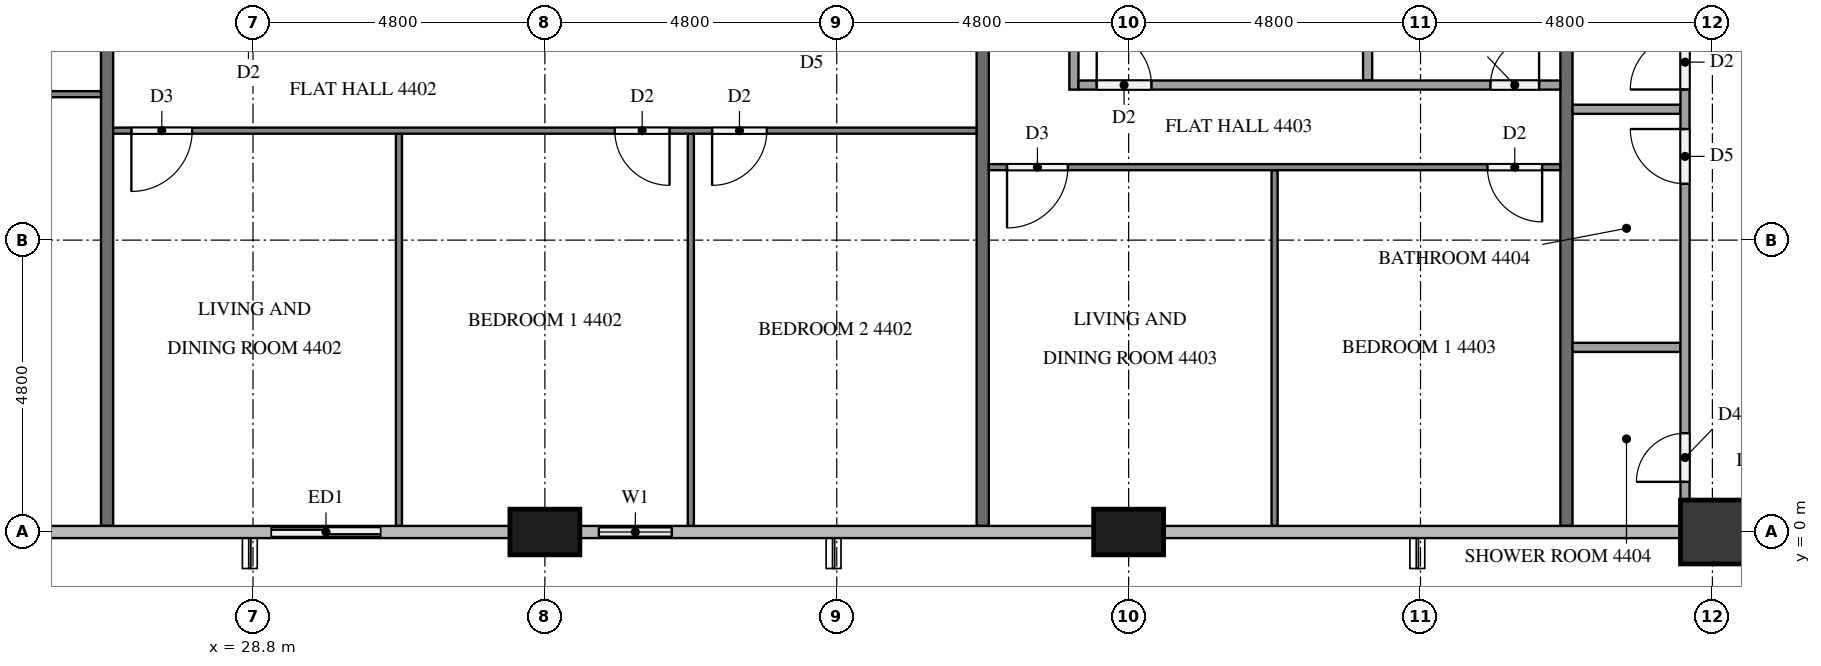
"""IFC4 building model, lengths in metres.
Left out: names, types, materials, properties, quantities, classifications, styles, units other than length and angle.
Written with IfcOpenShell. Run it as: python <this file> out.ifc"""

import sys

from ifc_helpers import new_model, si_unit, direction, frame, frame_2d, origin, origin_2d, place, context, subcontext, project, spatial, rectangle, extrude, element, fill, save


model = new_model("IFC4")
c1 = context("Model", 3, precision=1e-05, world=origin(), true_north=direction((0.0, 1.0)))
c2 = subcontext(c1, "Body", "Model", "MODEL_VIEW")
j1 = project(units=[si_unit("LENGTHUNIT", "METRE"), si_unit("PLANEANGLEUNIT", "RADIAN")], contexts=[c1])
p1 = place(None, origin())
s1 = spatial("IfcSite", under=j1, at=p1, CompositionType="ELEMENT")
p2 = place(p1, origin())
s2 = spatial("IfcBuilding", under=s1, at=p2, CompositionType="ELEMENT")
p3 = place(p2, frame((0.0, 0.0, 170.0)))
s3 = spatial("IfcBuildingStorey", under=s2, at=p3, CompositionType="ELEMENT", Elevation=170.0)
for number, where, z_axis, x_axis in (
    (1, (33.6, 0.0, 0.0), (0.0, 0.0, 1.0), (1.0, 0.0, 0.0)),
    (2, (43.2, 0.0, 0.0), (0.0, 0.0, 1.0), (1.0, 0.0, 0.0)),
):
    element("IfcColumn", number, at=place(p3, frame(where, z_axis=z_axis, x_axis=x_axis)), inside=s3, PredefinedType="COLUMN", context=c2, shape_type="SweptSolid", body=[
        extrude(rectangle(XDim=1.15, YDim=0.75, at=origin_2d()), origin(), (0.0, 0.0, 1.0), 3.1),
    ])
p4 = place(p3, frame((52.8, 0.0, 0.0), z_axis=(0.0, 0.0, 1.0), x_axis=(1.0, 0.0, 0.0)))
e3 = element("IfcColumn", 3, at=p4, inside=s3, PredefinedType="COLUMN", context=c2, shape_type="SweptSolid", body=[
    extrude(rectangle(XDim=1.05, YDim=1.05, at=origin_2d()), origin(), (0.0, 0.0, 1.0), 3.1),
])
p5 = place(p3, frame((28.8, 0.0, 0.0), z_axis=(0.0, 0.0, 1.0), x_axis=(1.0, 0.0, 0.0)))
e4 = element("IfcWall", 4, at=p5, inside=s3, PredefinedType="SOLIDWALL", context=c2, shape_type="SweptSolid", body=[
    extrude(rectangle(XDim=2.4, YDim=0.15, at=frame_2d((1.2, 0.0))), origin(), (0.0, 0.0, 1.0), 3.1),
])
p6 = place(p5, frame((0.3, 0.0, 0.0)))
e5 = element("IfcOpeningElement", 5, at=p6, cuts=e4, PredefinedType="OPENING", context=c2, shape_type="SweptSolid", body=[
    extrude(rectangle(XDim=1.8, YDim=2.4, at=frame_2d((0.9, 1.2))), frame((0.0, 0.085, 0.0), z_axis=(0.0, -1.0, 0.0), x_axis=(1.0, 0.0, 0.0)), (0.0, 0.0, 1.0), 0.17),
])
p7 = place(p3, frame((34.175, 0.0, 0.0), z_axis=(0.0, 0.0, 1.0), x_axis=(1.0, 0.0, 0.0)))
e6 = element("IfcWall", 6, at=p7, inside=s3, PredefinedType="SOLIDWALL", context=c2, shape_type="SweptSolid", body=[
    extrude(rectangle(XDim=1.825, YDim=0.15, at=frame_2d((0.913, 0.0))), origin(), (0.0, 0.0, 1.0), 3.1),
])
p8 = place(p7, frame((0.312, 0.0, 0.9)))
e7 = element("IfcOpeningElement", 7, at=p8, cuts=e6, PredefinedType="OPENING", context=c2, shape_type="SweptSolid", body=[
    extrude(rectangle(XDim=1.2, YDim=1.4, at=frame_2d((0.6, 0.7))), frame((0.0, 0.085, 0.0), z_axis=(0.0, -1.0, 0.0), x_axis=(1.0, 0.0, 0.0)), (0.0, 0.0, 1.0), 0.17),
])
for number, where, z_axis, x_axis in (
    (8, (26.4, 11.9, 0.0), (0.0, 0.0, 1.0), (0.0, -1.0, 0.0)),
    (9, (40.8, 11.9, 0.0), (0.0, 0.0, 1.0), (0.0, -1.0, 0.0)),
    (10, (50.4, 11.9, 0.0), (0.0, 0.0, 1.0), (0.0, -1.0, 0.0)),
):
    element("IfcWall", number, at=place(p3, frame(where, z_axis=z_axis, x_axis=x_axis)), inside=s3, PredefinedType="PARTITIONING", context=c2, shape_type="SweptSolid", body=[
        extrude(rectangle(XDim=11.8, YDim=0.2, at=frame_2d((5.9, 0.0))), origin(), (0.0, 0.0, 1.0), 3.1),
    ])
p9 = place(p3, frame((26.3, 7.2, 0.0), z_axis=(0.0, 0.0, 1.0), x_axis=(-1.0, 0.0, 0.0)))
e11 = element("IfcWall", 11, at=p9, inside=s3, PredefinedType="PARTITIONING", context=c2, shape_type="SweptSolid", body=[
    extrude(rectangle(XDim=14.2, YDim=0.1, at=frame_2d((7.1, 0.0))), origin(), (0.0, 0.0, 1.0), 3.1),
])
p10 = place(p9, frame((12.9, 0.0, 0.0)))
e12 = element("IfcOpeningElement", 12, at=p10, cuts=e11, PredefinedType="OPENING", context=c2, shape_type="SweptSolid", body=[
    extrude(rectangle(XDim=1.0, YDim=2.1, at=frame_2d((0.5, 1.05))), frame((0.0, 0.06, 0.0), z_axis=(0.0, -1.0, 0.0), x_axis=(1.0, 0.0, 0.0)), (0.0, 0.0, 1.0), 0.12),
])
p11 = place(p9, frame((5.05, 0.0, 0.0)))
e13 = element("IfcOpeningElement", 13, at=p11, cuts=e11, PredefinedType="OPENING", context=c2, shape_type="SweptSolid", body=[
    extrude(rectangle(XDim=0.9, YDim=2.1, at=frame_2d((0.45, 1.05))), frame((0.0, 0.06, 0.0), z_axis=(0.0, -1.0, 0.0), x_axis=(1.0, 0.0, 0.0)), (0.0, 0.0, 1.0), 0.12),
])
p12 = place(p9, frame((3.45, 0.0, 0.0)))
e14 = element("IfcOpeningElement", 14, at=p12, cuts=e11, PredefinedType="OPENING", context=c2, shape_type="SweptSolid", body=[
    extrude(rectangle(XDim=0.9, YDim=2.1, at=frame_2d((0.45, 1.05))), frame((0.0, 0.06, 0.0), z_axis=(0.0, -1.0, 0.0), x_axis=(1.0, 0.0, 0.0)), (0.0, 0.0, 1.0), 0.12),
])
for number, where, z_axis, x_axis in (
    (15, (31.2, 6.55, 0.0), (0.0, 0.0, 1.0), (0.0, -1.0, 0.0)),
    (16, (36.0, 6.55, 0.0), (0.0, 0.0, 1.0), (0.0, -1.0, 0.0)),
):
    element("IfcWall", number, at=place(p3, frame(where, z_axis=z_axis, x_axis=x_axis)), inside=s3, PredefinedType="PARTITIONING", context=c2, shape_type="SweptSolid", body=[
        extrude(rectangle(XDim=6.45, YDim=0.1, at=frame_2d((3.225, 0.0))), origin(), (0.0, 0.0, 1.0), 3.1),
    ])
p13 = place(p3, frame((40.7, 6.6, 0.0), z_axis=(0.0, 0.0, 1.0), x_axis=(-1.0, 0.0, 0.0)))
e17 = element("IfcWall", 17, at=p13, inside=s3, PredefinedType="PARTITIONING", context=c2, shape_type="SweptSolid", body=[
    extrude(rectangle(XDim=14.2, YDim=0.1, at=frame_2d((7.1, 0.0))), origin(), (0.0, 0.0, 1.0), 3.1),
])
p14 = place(p13, frame((12.9, 0.0, 0.0)))
e18 = element("IfcOpeningElement", 18, at=p14, cuts=e17, PredefinedType="OPENING", context=c2, shape_type="SweptSolid", body=[
    extrude(rectangle(XDim=1.0, YDim=2.1, at=frame_2d((0.5, 1.05))), frame((0.0, 0.06, 0.0), z_axis=(0.0, -1.0, 0.0), x_axis=(1.0, 0.0, 0.0)), (0.0, 0.0, 1.0), 0.12),
])
p15 = place(p13, frame((5.05, 0.0, 0.0)))
e19 = element("IfcOpeningElement", 19, at=p15, cuts=e17, PredefinedType="OPENING", context=c2, shape_type="SweptSolid", body=[
    extrude(rectangle(XDim=0.9, YDim=2.1, at=frame_2d((0.45, 1.05))), frame((0.0, 0.06, 0.0), z_axis=(0.0, -1.0, 0.0), x_axis=(1.0, 0.0, 0.0)), (0.0, 0.0, 1.0), 0.12),
])
p16 = place(p13, frame((3.45, 0.0, 0.0)))
e20 = element("IfcOpeningElement", 20, at=p16, cuts=e17, PredefinedType="OPENING", context=c2, shape_type="SweptSolid", body=[
    extrude(rectangle(XDim=0.9, YDim=2.1, at=frame_2d((0.45, 1.05))), frame((0.0, 0.06, 0.0), z_axis=(0.0, -1.0, 0.0), x_axis=(1.0, 0.0, 0.0)), (0.0, 0.0, 1.0), 0.12),
])
p17 = place(p3, frame((45.6, 5.95, 0.0), z_axis=(0.0, 0.0, 1.0), x_axis=(0.0, -1.0, 0.0)))
e21 = element("IfcWall", 21, at=p17, inside=s3, PredefinedType="PARTITIONING", context=c2, shape_type="SweptSolid", body=[
    extrude(rectangle(XDim=5.85, YDim=0.1, at=frame_2d((2.925, 0.0))), origin(), (0.0, 0.0, 1.0), 3.1),
])
p18 = place(p3, frame((50.3, 6.0, 0.0), z_axis=(0.0, 0.0, 1.0), x_axis=(-1.0, 0.0, 0.0)))
e22 = element("IfcWall", 22, at=p18, inside=s3, PredefinedType="PARTITIONING", context=c2, shape_type="SweptSolid", body=[
    extrude(rectangle(XDim=9.4, YDim=0.1, at=frame_2d((4.7, 0.0))), origin(), (0.0, 0.0, 1.0), 3.1),
])
p19 = place(p18, frame((8.1, 0.0, 0.0)))
e23 = element("IfcOpeningElement", 23, at=p19, cuts=e22, PredefinedType="OPENING", context=c2, shape_type="SweptSolid", body=[
    extrude(rectangle(XDim=1.0, YDim=2.1, at=frame_2d((0.5, 1.05))), frame((0.0, 0.06, 0.0), z_axis=(0.0, -1.0, 0.0), x_axis=(1.0, 0.0, 0.0)), (0.0, 0.0, 1.0), 0.12),
])
p20 = place(p18, frame((0.3, 0.0, 0.0)))
e24 = element("IfcOpeningElement", 24, at=p20, cuts=e22, PredefinedType="OPENING", context=c2, shape_type="SweptSolid", body=[
    extrude(rectangle(XDim=0.9, YDim=2.1, at=frame_2d((0.45, 1.05))), frame((0.0, 0.06, 0.0), z_axis=(0.0, -1.0, 0.0), x_axis=(1.0, 0.0, 0.0)), (0.0, 0.0, 1.0), 0.12),
])
p21 = place(p3, frame((47.13, 11.9, 0.0), z_axis=(0.0, 0.0, 1.0), x_axis=(0.0, -1.0, 0.0)))
e25 = element("IfcWall", 25, at=p21, inside=s3, PredefinedType="PARTITIONING", context=c2, shape_type="SweptSolid", body=[
    extrude(rectangle(XDim=4.475, YDim=0.15, at=frame_2d((2.237, 0.0))), origin(), (0.0, 0.0, 1.0), 3.1),
])
p22 = place(p3, frame((42.3, 11.9, 0.0), z_axis=(0.0, 0.0, 1.0), x_axis=(0.0, -1.0, 0.0)))
e26 = element("IfcWall", 26, at=p22, inside=s3, PredefinedType="PARTITIONING", context=c2, shape_type="SweptSolid", body=[
    extrude(rectangle(XDim=4.625, YDim=0.15, at=frame_2d((2.312, 0.0))), origin(), (0.0, 0.0, 1.0), 3.1),
])
p23 = place(p3, frame((42.375, 7.35, 0.0), z_axis=(0.0, 0.0, 1.0), x_axis=(1.0, 0.0, 0.0)))
e27 = element("IfcWall", 27, at=p23, inside=s3, PredefinedType="PARTITIONING", context=c2, shape_type="SweptSolid", body=[
    extrude(rectangle(XDim=7.925, YDim=0.15, at=frame_2d((3.962, 0.0))), origin(), (0.0, 0.0, 1.0), 3.1),
])
p24 = place(p23, frame((0.3, 0.0, 0.0)))
e28 = element("IfcOpeningElement", 28, at=p24, cuts=e27, PredefinedType="OPENING", context=c2, shape_type="SweptSolid", body=[
    extrude(rectangle(XDim=0.9, YDim=2.1, at=frame_2d((0.45, 1.05))), frame((0.0, 0.085, 0.0), z_axis=(0.0, -1.0, 0.0), x_axis=(1.0, 0.0, 0.0)), (0.0, 0.0, 1.0), 0.17),
])
p25 = place(p23, frame((6.775, 0.0, 0.0)))
e29 = element("IfcOpeningElement", 29, at=p25, cuts=e27, PredefinedType="OPENING", context=c2, shape_type="SweptSolid", body=[
    extrude(rectangle(XDim=0.8, YDim=2.1, at=frame_2d((0.4, 1.05))), frame((0.0, 0.085, 0.0), z_axis=(0.0, -1.0, 0.0), x_axis=(1.0, 0.0, 0.0)), (0.0, 0.0, 1.0), 0.17),
])
for number, where, z_axis, x_axis in (
    (30, (50.5, 6.952, 0.0), (0.0, 0.0, 1.0), (1.0, 0.0, 0.0)),
    (31, (50.5, 3.037, 0.0), (0.0, 0.0, 1.0), (1.0, 0.0, 0.0)),
):
    element("IfcWall", number, at=place(p3, frame(where, z_axis=z_axis, x_axis=x_axis)), inside=s3, PredefinedType="PARTITIONING", context=c2, shape_type="SweptSolid", body=[
        extrude(rectangle(XDim=1.775, YDim=0.15, at=frame_2d((0.887, 0.0))), origin(), (0.0, 0.0, 1.0), 3.1),
    ])
p26 = place(p3, frame((52.35, 0.525, 0.0), z_axis=(0.0, 0.0, 1.0), x_axis=(0.0, 1.0, 0.0)))
e32 = element("IfcWall", 32, at=p26, inside=s3, PredefinedType="PARTITIONING", context=c2, shape_type="SweptSolid", body=[
    extrude(rectangle(XDim=12.3, YDim=0.15, at=frame_2d((6.15, 0.0))), origin(), (0.0, 0.0, 1.0), 3.1),
])
p27 = place(p26, frame((6.752, 0.0, 0.0)))
e33 = element("IfcOpeningElement", 33, at=p27, cuts=e32, PredefinedType="OPENING", context=c2, shape_type="SweptSolid", body=[
    extrude(rectangle(XDim=0.9, YDim=2.1, at=frame_2d((0.45, 1.05))), frame((0.0, 0.085, 0.0), z_axis=(0.0, -1.0, 0.0), x_axis=(1.0, 0.0, 0.0)), (0.0, 0.0, 1.0), 0.17),
])
p28 = place(p26, frame((5.202, 0.0, 0.0)))
e34 = element("IfcOpeningElement", 34, at=p28, cuts=e32, PredefinedType="OPENING", context=c2, shape_type="SweptSolid", body=[
    extrude(rectangle(XDim=0.9, YDim=2.1, at=frame_2d((0.45, 1.05))), frame((0.0, 0.085, 0.0), z_axis=(0.0, -1.0, 0.0), x_axis=(1.0, 0.0, 0.0)), (0.0, 0.0, 1.0), 0.17),
])
p29 = place(p26, frame((0.3, 0.0, 0.0)))
e35 = element("IfcOpeningElement", 35, at=p29, cuts=e32, PredefinedType="OPENING", context=c2, shape_type="SweptSolid", body=[
    extrude(rectangle(XDim=0.8, YDim=2.1, at=frame_2d((0.4, 1.05))), frame((0.0, 0.085, 0.0), z_axis=(0.0, -1.0, 0.0), x_axis=(1.0, 0.0, 0.0)), (0.0, 0.0, 1.0), 0.17),
])
p30 = place(p6, origin())
e36 = element("IfcDoor", 36, at=p30, inside=s3, OperationType="SLIDING_TO_LEFT", PredefinedType="DOOR", context=c2, shape_type="SweptSolid", body=[
    extrude(rectangle(XDim=1.8, YDim=2.4, at=frame_2d((0.9, 1.2))), frame((0.0, 0.025, 0.0), z_axis=(0.0, -1.0, 0.0), x_axis=(1.0, 0.0, 0.0)), (0.0, 0.0, 1.0), 0.05),
])
fill(e5, e36)
p31 = place(p8, origin())
e37 = element("IfcWindow", 37, at=p31, inside=s3, PartitioningType="SINGLE_PANEL", PredefinedType="WINDOW", context=c2, shape_type="SweptSolid", body=[
    extrude(rectangle(XDim=1.2, YDim=1.4, at=frame_2d((0.6, 0.7))), frame((0.0, 0.03, 0.0), z_axis=(0.0, -1.0, 0.0), x_axis=(1.0, 0.0, 0.0)), (0.0, 0.0, 1.0), 0.06),
])
fill(e7, e37)
p32 = place(p14, origin())
e38 = element("IfcDoor", 38, at=p32, inside=s3, OperationType="SINGLE_SWING_RIGHT", PredefinedType="DOOR", context=c2, shape_type="SweptSolid", body=[
    extrude(rectangle(XDim=1.0, YDim=2.1, at=frame_2d((0.5, 1.05))), frame((0.0, 0.025, 0.0), z_axis=(0.0, -1.0, 0.0), x_axis=(1.0, 0.0, 0.0)), (0.0, 0.0, 1.0), 0.05),
])
fill(e18, e38)
p33 = place(p15, origin())
e39 = element("IfcDoor", 39, at=p33, inside=s3, OperationType="SINGLE_SWING_LEFT", PredefinedType="DOOR", context=c2, shape_type="SweptSolid", body=[
    extrude(rectangle(XDim=0.9, YDim=2.1, at=frame_2d((0.45, 1.05))), frame((0.0, 0.025, 0.0), z_axis=(0.0, -1.0, 0.0), x_axis=(1.0, 0.0, 0.0)), (0.0, 0.0, 1.0), 0.05),
])
fill(e19, e39)
p34 = place(p16, origin())
e40 = element("IfcDoor", 40, at=p34, inside=s3, OperationType="SINGLE_SWING_RIGHT", PredefinedType="DOOR", context=c2, shape_type="SweptSolid", body=[
    extrude(rectangle(XDim=0.9, YDim=2.1, at=frame_2d((0.45, 1.05))), frame((0.0, 0.025, 0.0), z_axis=(0.0, -1.0, 0.0), x_axis=(1.0, 0.0, 0.0)), (0.0, 0.0, 1.0), 0.05),
])
fill(e20, e40)
p35 = place(p19, origin())
e41 = element("IfcDoor", 41, at=p35, inside=s3, OperationType="SINGLE_SWING_RIGHT", PredefinedType="DOOR", context=c2, shape_type="SweptSolid", body=[
    extrude(rectangle(XDim=1.0, YDim=2.1, at=frame_2d((0.5, 1.05))), frame((0.0, 0.025, 0.0), z_axis=(0.0, -1.0, 0.0), x_axis=(1.0, 0.0, 0.0)), (0.0, 0.0, 1.0), 0.05),
])
fill(e23, e41)
p36 = place(p20, origin())
e42 = element("IfcDoor", 42, at=p36, inside=s3, OperationType="SINGLE_SWING_LEFT", PredefinedType="DOOR", context=c2, shape_type="SweptSolid", body=[
    extrude(rectangle(XDim=0.9, YDim=2.1, at=frame_2d((0.45, 1.05))), frame((0.0, 0.025, 0.0), z_axis=(0.0, -1.0, 0.0), x_axis=(1.0, 0.0, 0.0)), (0.0, 0.0, 1.0), 0.05),
])
fill(e24, e42)
p37 = place(p24, origin())
e43 = element("IfcDoor", 43, at=p37, inside=s3, OperationType="SINGLE_SWING_LEFT", PredefinedType="DOOR", context=c2, shape_type="SweptSolid", body=[
    extrude(rectangle(XDim=0.9, YDim=2.1, at=frame_2d((0.45, 1.05))), frame((0.0, 0.025, 0.0), z_axis=(0.0, -1.0, 0.0), x_axis=(1.0, 0.0, 0.0)), (0.0, 0.0, 1.0), 0.05),
])
fill(e28, e43)
p38 = place(p25, origin())
e44 = element("IfcDoor", 44, at=p38, inside=s3, OperationType="SINGLE_SWING_RIGHT", PredefinedType="DOOR", context=c2, shape_type="SweptSolid", body=[
    extrude(rectangle(XDim=0.8, YDim=2.1, at=frame_2d((0.4, 1.05))), frame((0.0, 0.025, 0.0), z_axis=(0.0, -1.0, 0.0), x_axis=(1.0, 0.0, 0.0)), (0.0, 0.0, 1.0), 0.05),
])
fill(e29, e44)
p39 = place(p27, origin())
e45 = element("IfcDoor", 45, at=p39, inside=s3, OperationType="SINGLE_SWING_LEFT", PredefinedType="DOOR", context=c2, shape_type="SweptSolid", body=[
    extrude(rectangle(XDim=0.9, YDim=2.1, at=frame_2d((0.45, 1.05))), frame((0.0, 0.025, 0.0), z_axis=(0.0, -1.0, 0.0), x_axis=(1.0, 0.0, 0.0)), (0.0, 0.0, 1.0), 0.05),
])
fill(e33, e45)
p40 = place(p28, origin())
e46 = element("IfcDoor", 46, at=p40, inside=s3, OperationType="SINGLE_SWING_RIGHT", PredefinedType="DOOR", context=c2, shape_type="SweptSolid", body=[
    extrude(rectangle(XDim=0.9, YDim=2.1, at=frame_2d((0.45, 1.05))), frame((0.0, 0.025, 0.0), z_axis=(0.0, -1.0, 0.0), x_axis=(1.0, 0.0, 0.0)), (0.0, 0.0, 1.0), 0.05),
])
fill(e34, e46)
p41 = place(p29, origin())
e47 = element("IfcDoor", 47, at=p41, inside=s3, OperationType="SINGLE_SWING_LEFT", PredefinedType="DOOR", context=c2, shape_type="SweptSolid", body=[
    extrude(rectangle(XDim=0.8, YDim=2.1, at=frame_2d((0.4, 1.05))), frame((0.0, 0.025, 0.0), z_axis=(0.0, -1.0, 0.0), x_axis=(1.0, 0.0, 0.0)), (0.0, 0.0, 1.0), 0.05),
])
fill(e35, e47)
save(model, sys.argv[1])
